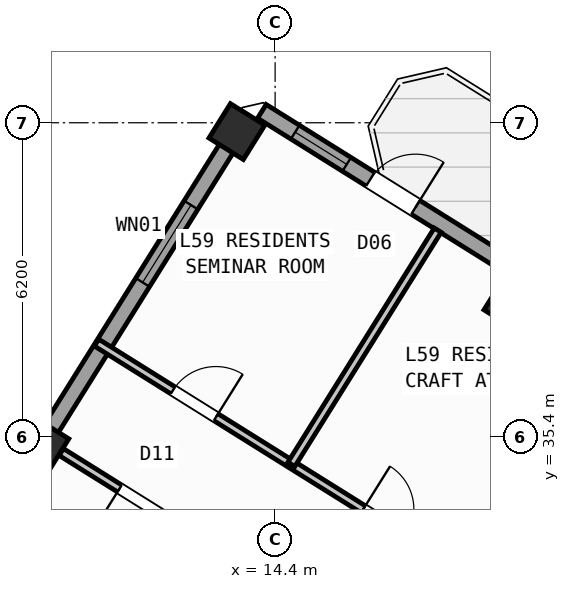
"""IFC4 building model, lengths in metres.
Left out: names, types, materials, properties, quantities, classifications, styles, units other than length and angle.
Written with IfcOpenShell. Run it as: python <this file> out.ifc"""

import sys

from ifc_helpers import new_model, si_unit, direction, frame, frame_2d, origin, origin_2d, place, context, subcontext, project, spatial, rectangle, hollow_rectangle, extrude, source, transform, mapped, element, fill, save


model = new_model("IFC4")
c1 = context("Model", 3, precision=1e-05, world=origin(), true_north=direction((0.0, 1.0)))
c2 = subcontext(c1, "Body", "Model", "MODEL_VIEW")
j1 = project(units=[si_unit("LENGTHUNIT", "METRE"), si_unit("PLANEANGLEUNIT", "RADIAN")], contexts=[c1])
p1 = place(None, origin())
s1 = spatial("IfcSite", under=j1, at=p1, CompositionType="ELEMENT")
p2 = place(p1, origin())
s2 = spatial("IfcBuilding", under=s1, at=p2, CompositionType="ELEMENT")
p3 = place(p2, frame((0.0, 0.0, 233.7)))
s3 = spatial("IfcBuildingStorey", under=s2, at=p3, CompositionType="ELEMENT", Elevation=233.7)
m1 = source(origin(), c2, "Body", "SweptSolid", [
    extrude(hollow_rectangle(XDim=0.8, YDim=0.8, WallThickness=0.032, at=origin_2d()), origin(), (0.0, 0.0, 1.0), 4.8),
])
for number, where, z_axis, x_axis in (
    (1, (19.073, 38.034, 0.0), (0.0, 0.0, 1.0), (-0.848, 0.53, 0.0)),
    (2, (13.646, 41.426, 0.0), (0.0, 0.0, 1.0), (-0.848, 0.53, 0.0)),
    (3, (9.777, 35.235, 0.0), (0.0, 0.0, 1.0), (-0.848, 0.53, 0.0)),
):
    element("IfcColumn", number, at=place(p3, frame(where, z_axis=z_axis, x_axis=x_axis)), inside=s3, PredefinedType="COLUMN", context=c2, shape_type="MappedRepresentation", body=[
        mapped(m1, transform((0.0, 0.0, 0.0), scale=1.0)),
    ])
p4 = place(p3, frame((2.415, 23.452, 0.0), z_axis=(0.0, 0.0, 1.0), x_axis=(0.52991049553, 0.848053575387, 0.0)))
e4 = element("IfcWall", 4, at=p4, inside=s3, PredefinedType="STANDARD", context=c2, shape_type="SweptSolid", body=[
    extrude(rectangle(XDim=21.587, YDim=0.32, at=frame_2d((10.794, 0.0))), origin(), (0.0, 0.0, 1.0), 4.075),
])
p5 = place(p4, frame((8.026, 0.0, 0.75)))
e5 = element("IfcOpeningElement", 5, at=p5, cuts=e4, PredefinedType="OPENING", context=c2, shape_type="SweptSolid", body=[
    extrude(rectangle(XDim=2.4, YDim=1.6, at=frame_2d((1.2, 0.8))), frame((0.0, 0.17, 0.0), z_axis=(0.0, -1.0, 0.0), x_axis=(1.0, 0.0, 0.0)), (0.0, 0.0, 1.0), 0.34),
])
p6 = place(p4, frame((17.684, 0.0, 0.85)))
e6 = element("IfcOpeningElement", 6, at=p6, cuts=e4, PredefinedType="OPENING", context=c2, shape_type="SweptSolid", body=[
    extrude(rectangle(XDim=1.8, YDim=1.5, at=frame_2d((0.9, 0.75))), frame((0.0, 0.17, 0.0), z_axis=(0.0, -1.0, 0.0), x_axis=(1.0, 0.0, 0.0)), (0.0, 0.0, 1.0), 0.34),
])
p7 = place(p3, frame((14.138, 41.825, 0.0), z_axis=(0.0, 0.0, 1.0), x_axis=(0.848046498049, -0.529921821731, 0.0)))
e7 = element("IfcWall", 7, at=p7, inside=s3, PredefinedType="STANDARD", context=c2, shape_type="SweptSolid", body=[
    extrude(rectangle(XDim=31.588, YDim=0.32, at=frame_2d((15.794, 0.0))), origin(), (0.0, 0.0, 1.0), 4.55),
])
p8 = place(p7, frame((2.526, 0.0, 0.0)))
e8 = element("IfcOpeningElement", 8, at=p8, cuts=e7, PredefinedType="OPENING", context=c2, shape_type="SweptSolid", body=[
    extrude(rectangle(XDim=1.05, YDim=2.15, at=frame_2d((0.525, 1.075))), frame((0.0, 0.17, 0.0), z_axis=(0.0, -1.0, 0.0), x_axis=(1.0, 0.0, 0.0)), (0.0, 0.0, 1.0), 0.34),
])
p9 = place(p7, frame((14.274, 0.0, 0.0)))
e9 = element("IfcOpeningElement", 9, at=p9, cuts=e7, PredefinedType="OPENING", context=c2, shape_type="SweptSolid", body=[
    extrude(rectangle(XDim=1.5, YDim=2.25, at=frame_2d((0.75, 1.125))), frame((0.0, 0.17, 0.0), z_axis=(0.0, -1.0, 0.0), x_axis=(1.0, 0.0, 0.0)), (0.0, 0.0, 1.0), 0.34),
])
p10 = place(p7, frame((0.775, 0.0, 0.95)))
e10 = element("IfcOpeningElement", 10, at=p10, cuts=e7, PredefinedType="OPENING", context=c2, shape_type="SweptSolid", body=[
    extrude(rectangle(XDim=1.2, YDim=1.4, at=frame_2d((0.6, 0.7))), frame((0.0, 0.17, 0.0), z_axis=(0.0, -1.0, 0.0), x_axis=(1.0, 0.0, 0.0)), (0.0, 0.0, 1.0), 0.34),
])
p11 = place(p7, frame((9.552, 0.0, 0.85)))
e11 = element("IfcOpeningElement", 11, at=p11, cuts=e7, PredefinedType="OPENING", context=c2, shape_type="SweptSolid", body=[
    extrude(rectangle(XDim=1.8, YDim=1.5, at=frame_2d((0.9, 0.75))), frame((0.0, 0.17, 0.0), z_axis=(0.0, -1.0, 0.0), x_axis=(1.0, 0.0, 0.0)), (0.0, 0.0, 1.0), 0.34),
])
p12 = place(p7, frame((21.969, 0.0, 0.95)))
e12 = element("IfcOpeningElement", 12, at=p12, cuts=e7, PredefinedType="OPENING", context=c2, shape_type="SweptSolid", body=[
    extrude(rectangle(XDim=1.2, YDim=1.4, at=frame_2d((0.6, 0.7))), frame((0.0, 0.17, 0.0), z_axis=(0.0, -1.0, 0.0), x_axis=(1.0, 0.0, 0.0)), (0.0, 0.0, 1.0), 0.34),
])
p13 = place(p7, frame((27.619, 0.0, 0.95)))
e13 = element("IfcOpeningElement", 13, at=p13, cuts=e7, PredefinedType="OPENING", context=c2, shape_type="SweptSolid", body=[
    extrude(rectangle(XDim=1.2, YDim=1.4, at=frame_2d((0.6, 0.7))), frame((0.0, 0.17, 0.0), z_axis=(0.0, -1.0, 0.0), x_axis=(1.0, 0.0, 0.0)), (0.0, 0.0, 1.0), 0.34),
])
p14 = place(p3, frame((25.065, 28.394, 0.0), z_axis=(0.0, 0.0, 1.0), x_axis=(-0.848048310262, 0.529918921593, 0.0)))
e14 = element("IfcWall", 14, at=p14, inside=s3, PredefinedType="PARTITIONING", context=c2, shape_type="SweptSolid", body=[
    extrude(rectangle(XDim=16.73, YDim=0.16, at=frame_2d((8.365, 0.0))), origin(), (0.0, 0.0, 1.0), 4.54),
])
p15 = place(p14, frame((1.338, 0.0, 0.0)))
e15 = element("IfcOpeningElement", 15, at=p15, cuts=e14, PredefinedType="OPENING", context=c2, shape_type="SweptSolid", body=[
    extrude(rectangle(XDim=1.0, YDim=2.1, at=frame_2d((0.5, 1.05))), frame((0.0, 0.09, 0.0), z_axis=(0.0, -1.0, 0.0), x_axis=(1.0, 0.0, 0.0)), (0.0, 0.0, 1.0), 0.18),
])
p16 = place(p14, frame((5.265, 0.0, 0.0)))
e16 = element("IfcOpeningElement", 16, at=p16, cuts=e14, PredefinedType="OPENING", context=c2, shape_type="SweptSolid", body=[
    extrude(rectangle(XDim=1.0, YDim=2.1, at=frame_2d((0.5, 1.05))), frame((0.0, 0.09, 0.0), z_axis=(0.0, -1.0, 0.0), x_axis=(1.0, 0.0, 0.0)), (0.0, 0.0, 1.0), 0.18),
])
p17 = place(p14, frame((9.526, 0.0, 0.0)))
e17 = element("IfcOpeningElement", 17, at=p17, cuts=e14, PredefinedType="OPENING", context=c2, shape_type="SweptSolid", body=[
    extrude(rectangle(XDim=1.0, YDim=2.1, at=frame_2d((0.5, 1.05))), frame((0.0, 0.09, 0.0), z_axis=(0.0, -1.0, 0.0), x_axis=(1.0, 0.0, 0.0)), (0.0, 0.0, 1.0), 0.18),
])
p18 = place(p14, frame((13.954, 0.0, 0.0)))
e18 = element("IfcOpeningElement", 18, at=p18, cuts=e14, PredefinedType="OPENING", context=c2, shape_type="SweptSolid", body=[
    extrude(rectangle(XDim=1.0, YDim=2.1, at=frame_2d((0.5, 1.05))), frame((0.0, 0.09, 0.0), z_axis=(0.0, -1.0, 0.0), x_axis=(1.0, 0.0, 0.0)), (0.0, 0.0, 1.0), 0.18),
])
p19 = place(p3, frame((14.908, 32.147, 0.0), z_axis=(0.0, 0.0, 1.0), x_axis=(-0.848049955116, 0.529916289265, 0.0)))
e19 = element("IfcWall", 19, at=p19, inside=s3, PredefinedType="PARTITIONING", context=c2, shape_type="SweptSolid", body=[
    extrude(rectangle(XDim=5.576, YDim=0.16, at=frame_2d((2.788, 0.0))), origin(), (0.0, 0.0, 1.0), 4.075),
])
p20 = place(p19, frame((3.218, 0.0, 0.0)))
e20 = element("IfcOpeningElement", 20, at=p20, cuts=e19, PredefinedType="OPENING", context=c2, shape_type="SweptSolid", body=[
    extrude(rectangle(XDim=1.0, YDim=2.1, at=frame_2d((0.5, 1.05))), frame((0.0, 0.09, 0.0), z_axis=(0.0, -1.0, 0.0), x_axis=(1.0, 0.0, 0.0)), (0.0, 0.0, 1.0), 0.18),
])
for number, where, z_axis, x_axis in (
    (21, (21.292, 37.178, 0.0), (0.0, 0.0, 1.0), (-0.53, -0.848, 0.0)),
    (22, (17.608, 39.48, 0.0), (0.0, 0.0, 1.0), (-0.53, -0.848, 0.0)),
):
    element("IfcWall", number, at=place(p3, frame(where, z_axis=z_axis, x_axis=x_axis)), inside=s3, PredefinedType="PARTITIONING", context=c2, shape_type="SweptSolid", body=[
        extrude(rectangle(XDim=5.45, YDim=0.16, at=frame_2d((2.725, 0.0))), origin(), (0.0, 0.0, 1.0), 4.225),
    ])
m2 = source(origin(), c2, "Body", "SweptSolid", [
    extrude(rectangle(XDim=1.05, YDim=2.15, at=frame_2d((0.525, 1.075))), frame((0.0, 0.025, 0.0), z_axis=(0.0, -1.0, 0.0), x_axis=(1.0, 0.0, 0.0)), (0.0, 0.0, 1.0), 0.05),
])
p21 = place(p8, origin())
e23 = element("IfcDoor", 23, at=p21, inside=s3, OperationType="SINGLE_SWING_RIGHT", PredefinedType="DOOR", context=c2, shape_type="MappedRepresentation", body=[
    mapped(m2, transform((0.0, 0.0, 0.0), scale=1.0)),
])
fill(e8, e23)
m3 = source(origin(), c2, "Body", "SweptSolid", [
    extrude(rectangle(XDim=1.8, YDim=1.5, at=frame_2d((0.9, 0.75))), frame((0.0, 0.03, 0.0), z_axis=(0.0, -1.0, 0.0), x_axis=(1.0, 0.0, 0.0)), (0.0, 0.0, 1.0), 0.06),
])
p22 = place(p6, origin())
e24 = element("IfcWindow", 24, at=p22, inside=s3, PartitioningType="SINGLE_PANEL", PredefinedType="WINDOW", context=c2, shape_type="MappedRepresentation", body=[
    mapped(m3, transform((0.0, 0.0, 0.0), scale=1.0)),
])
fill(e6, e24)
m4 = source(origin(), c2, "Body", "SweptSolid", [
    extrude(rectangle(XDim=1.2, YDim=1.4, at=frame_2d((0.6, 0.7))), frame((0.0, 0.03, 0.0), z_axis=(0.0, -1.0, 0.0), x_axis=(1.0, 0.0, 0.0)), (0.0, 0.0, 1.0), 0.06),
])
p23 = place(p10, origin())
e25 = element("IfcWindow", 25, at=p23, inside=s3, PartitioningType="SINGLE_PANEL", PredefinedType="WINDOW", context=c2, shape_type="MappedRepresentation", body=[
    mapped(m4, transform((0.0, 0.0, 0.0), scale=1.0)),
])
fill(e10, e25)
m5 = source(origin(), c2, "Body", "SweptSolid", [
    extrude(rectangle(XDim=1.0, YDim=2.1, at=frame_2d((0.5, 1.05))), frame((0.0, 0.025, 0.0), z_axis=(0.0, -1.0, 0.0), x_axis=(1.0, 0.0, 0.0)), (0.0, 0.0, 1.0), 0.05),
])
p24 = place(p20, origin())
e26 = element("IfcDoor", 26, at=p24, inside=s3, OperationType="SINGLE_SWING_RIGHT", PredefinedType="DOOR", context=c2, shape_type="MappedRepresentation", body=[
    mapped(m5, transform((0.0, 0.0, 0.0), scale=1.0)),
])
fill(e20, e26)
p25 = place(p17, frame((1.0, 0.0, 0.0), z_axis=(0.0, 0.0, 1.0), x_axis=(-1.0, 0.0, 0.0)))
e27 = element("IfcDoor", 27, at=p25, inside=s3, OperationType="SINGLE_SWING_LEFT", PredefinedType="DOOR", context=c2, shape_type="MappedRepresentation", body=[
    mapped(m5, transform((0.0, 0.0, 0.0), scale=1.0)),
])
fill(e17, e27)
p26 = place(p18, frame((1.0, 0.0, 0.0), z_axis=(0.0, 0.0, 1.0), x_axis=(-1.0, 0.0, 0.0)))
e28 = element("IfcDoor", 28, at=p26, inside=s3, OperationType="SINGLE_SWING_RIGHT", PredefinedType="DOOR", context=c2, shape_type="MappedRepresentation", body=[
    mapped(m5, transform((0.0, 0.0, 0.0), scale=1.0)),
])
fill(e18, e28)
save(model, sys.argv[1])
